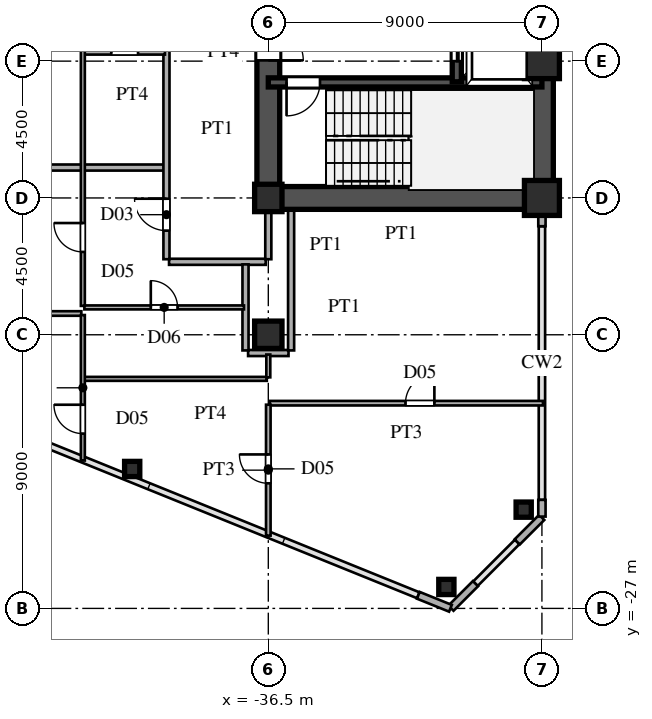
"""IFC4 building model, lengths in metres.
Left out: names, types, materials, properties, quantities, classifications, styles, units other than length and angle.
Written with IfcOpenShell. Run it as: python <this file> out.ifc"""

import sys

from ifc_helpers import new_model, si_unit, direction, frame, frame_2d, origin, origin_2d, place, context, subcontext, project, spatial, rectangle, hollow_rectangle, i_section, extrude, source, transform, mapped, element, fill, save


model = new_model("IFC4")
c1 = context("Model", 3, precision=1e-05, world=origin(), true_north=direction((0.0, 1.0)))
c2 = subcontext(c1, "Body", "Model", "MODEL_VIEW")
j1 = project(units=[si_unit("LENGTHUNIT", "METRE"), si_unit("PLANEANGLEUNIT", "RADIAN")], contexts=[c1])
p1 = place(None, origin())
s1 = spatial("IfcSite", under=j1, at=p1, CompositionType="ELEMENT")
p2 = place(p1, origin())
s2 = spatial("IfcBuilding", under=s1, at=p2, CompositionType="ELEMENT")
p3 = place(p2, frame((0.0, 0.0, 58.5)))
s3 = spatial("IfcBuildingStorey", under=s2, at=p3, CompositionType="ELEMENT", Elevation=58.5)
m1 = source(origin(), c2, "Body", "SweptSolid", [
    extrude(hollow_rectangle(XDim=1.15, YDim=1.15, WallThickness=0.048, at=origin_2d()), origin(), (0.0, 0.0, 1.0), 3.6),
])
for number, where, z_axis, x_axis in (
    (1, (-27.5, -13.5, 0.0), (0.0, 0.0, 1.0), (1.0, 0.0, 0.0)),
    (2, (-27.5, -9.0, 0.0), (0.0, 0.0, 1.0), (1.0, 0.0, 0.0)),
):
    element("IfcColumn", number, at=place(p3, frame(where, z_axis=z_axis, x_axis=x_axis)), inside=s3, PredefinedType="COLUMN", context=c2, shape_type="MappedRepresentation", body=[
        mapped(m1, transform((0.0, 0.0, 0.0), scale=1.0)),
    ])
m2 = source(origin(), c2, "Body", "SweptSolid", [
    extrude(i_section(OverallWidth=0.9, OverallDepth=0.9, WebThickness=0.036, FlangeThickness=0.055, at=origin_2d()), origin(), (0.0, 0.0, 1.0), 3.6),
])
for number, where, z_axis, x_axis in (
    (3, (-36.5, -18.0, 0.0), (0.0, 0.0, 1.0), (1.0, 0.0, 0.0)),
    (4, (-36.5, -13.5, 0.0), (0.0, 0.0, 1.0), (1.0, 0.0, 0.0)),
):
    element("IfcColumn", number, at=place(p3, frame(where, z_axis=z_axis, x_axis=x_axis)), inside=s3, PredefinedType="COLUMN", context=c2, shape_type="MappedRepresentation", body=[
        mapped(m2, transform((0.0, 0.0, 0.0), scale=1.0)),
    ])
m3 = source(origin(), c2, "Body", "SweptSolid", [
    extrude(hollow_rectangle(XDim=0.5, YDim=0.5, WallThickness=0.02, at=origin_2d()), origin(), (0.0, 0.0, 1.0), 3.6),
])
for number, where, z_axis, x_axis in (
    (5, (-28.1, -23.751, 0.0), (0.0, 0.0, 1.0), (1.0, 0.0, 0.0)),
    (6, (-30.643, -26.295, 0.0), (0.0, 0.0, 1.0), (1.0, 0.0, 0.0)),
    (7, (-40.977, -22.414, 0.0), (0.0, 0.0, 1.0), (1.0, 0.0, 0.0)),
):
    element("IfcColumn", number, at=place(p3, frame(where, z_axis=z_axis, x_axis=x_axis)), inside=s3, PredefinedType="COLUMN", context=c2, shape_type="MappedRepresentation", body=[
        mapped(m3, transform((0.0, 0.0, 0.0), scale=1.0)),
    ])
p4 = place(p3, frame((-27.5, -23.98, 0.0), z_axis=(0.0, 0.0, 1.0), x_axis=(0.0, 1.0, 0.0)))
e8 = element("IfcWall", 8, at=p4, inside=s3, PredefinedType="SOLIDWALL", context=c2, shape_type="SweptSolid", body=[
    extrude(rectangle(XDim=0.55, YDim=0.24, at=frame_2d((0.275, 0.0))), origin(), (0.0, 0.0, 1.0), 3.38),
])
p5 = place(p3, frame((-27.5, -14.43, 0.0), z_axis=(0.0, 0.0, 1.0), x_axis=(0.0, 1.0, 0.0)))
e9 = element("IfcWall", 9, at=p5, inside=s3, PredefinedType="SOLIDWALL", context=c2, shape_type="SweptSolid", body=[
    extrude(rectangle(XDim=0.55, YDim=0.24, at=frame_2d((0.275, 0.0))), origin(), (0.0, 0.0, 1.0), 1.88),
])
p6 = place(p3, frame((-31.566, -26.569, 0.0), z_axis=(0.0, 0.0, 1.0), x_axis=(0.927007103665, -0.375043770452, 0.0)))
e10 = element("IfcWall", 10, at=p6, inside=s3, PredefinedType="SOLIDWALL", context=c2, shape_type="SweptSolid", body=[
    extrude(rectangle(XDim=1.14, YDim=0.24, at=frame_2d((0.57, 0.0))), origin(), (0.0, 0.0, 1.0), 3.38),
])
for number, where, z_axis, x_axis in (
    (11, (-30.493, -26.993, 0.0), (0.0, 0.0, 1.0), (0.707, 0.707, 0.0)),
    (12, (-28.313, -24.813, 0.0), (0.0, 0.0, 1.0), (0.707, 0.707, 0.0)),
):
    element("IfcWall", number, at=place(p3, frame(where, z_axis=z_axis, x_axis=x_axis)), inside=s3, PredefinedType="SOLIDWALL", context=c2, shape_type="SweptSolid", body=[
        extrude(rectangle(XDim=1.14, YDim=0.24, at=frame_2d((0.57, 0.0))), origin(), (0.0, 0.0, 1.0), 3.38),
    ])
p7 = place(p3, frame((-27.5, -13.5, 0.0), z_axis=(0.0, 0.0, 1.0), x_axis=(0.0, 1.0, 0.0)))
e13 = element("IfcWall", 13, at=p7, inside=s3, PredefinedType="SHEAR", context=c2, shape_type="SweptSolid", body=[
    extrude(rectangle(XDim=12.2, YDim=0.75, at=frame_2d((6.1, 0.0))), origin(), (0.0, 0.0, 1.0), 3.38),
])
p8 = place(p3, frame((-36.5, -13.5, 0.0), z_axis=(0.0, 0.0, 1.0), x_axis=(1.0, 0.0, 0.0)))
e14 = element("IfcWall", 14, at=p8, inside=s3, PredefinedType="SHEAR", context=c2, shape_type="SweptSolid", body=[
    extrude(rectangle(XDim=9.0, YDim=0.75, at=frame_2d((4.5, 0.0))), origin(), (0.0, 0.0, 1.0), 3.38),
])
p9 = place(p3, frame((-36.5, -13.65, 0.0), z_axis=(0.0, 0.0, 1.0), x_axis=(0.0, 1.0, 0.0)))
e15 = element("IfcWall", 15, at=p9, inside=s3, PredefinedType="SHEAR", context=c2, shape_type="SweptSolid", body=[
    extrude(rectangle(XDim=7.15, YDim=0.75, at=frame_2d((3.575, 0.0))), origin(), (0.0, 0.0, 1.0), 3.38),
])
p10 = place(p9, frame((4.675, 0.0, 0.0)))
e16 = element("IfcOpeningElement", 16, at=p10, cuts=e15, PredefinedType="OPENING", context=c2, shape_type="SweptSolid", body=[
    extrude(rectangle(XDim=1.15, YDim=2.2, at=frame_2d((0.575, 1.1))), frame((0.0, 0.385, 0.0), z_axis=(0.0, -1.0, 0.0), x_axis=(1.0, 0.0, 0.0)), (0.0, 0.0, 1.0), 0.77),
])
p11 = place(p3, frame((-36.5, -9.7, 0.0), z_axis=(0.0, 0.0, 1.0), x_axis=(1.0, 0.0, 0.0)))
e17 = element("IfcWall", 17, at=p11, inside=s3, PredefinedType="SHEAR", context=c2, shape_type="SweptSolid", body=[
    extrude(rectangle(XDim=9.0, YDim=0.3, at=frame_2d((4.5, 0.0))), origin(), (0.0, 0.0, 1.0), 3.38),
])
p12 = place(p11, frame((0.6, 0.0, 0.0)))
e18 = element("IfcOpeningElement", 18, at=p12, cuts=e17, PredefinedType="OPENING", context=c2, shape_type="SweptSolid", body=[
    extrude(rectangle(XDim=1.1, YDim=2.2, at=frame_2d((0.55, 1.1))), frame((0.0, 0.16, 0.0), z_axis=(0.0, -1.0, 0.0), x_axis=(1.0, 0.0, 0.0)), (0.0, 0.0, 1.0), 0.32),
])
p13 = place(p3, frame((-30.3, -9.68, 0.0), z_axis=(0.0, 0.0, 1.0), x_axis=(0.0, 1.0, 0.0)))
e19 = element("IfcWall", 19, at=p13, inside=s3, PredefinedType="SHEAR", context=c2, shape_type="SweptSolid", body=[
    extrude(rectangle(XDim=2.56, YDim=0.3, at=frame_2d((1.28, 0.0))), origin(), (0.0, 0.0, 1.0), 3.38),
])
p14 = place(p13, frame((0.68, 0.0, 0.0)))
e20 = element("IfcOpeningElement", 20, at=p14, cuts=e19, PredefinedType="OPENING", context=c2, shape_type="SweptSolid", body=[
    extrude(rectangle(XDim=1.2, YDim=2.25, at=frame_2d((0.6, 1.125))), frame((0.0, 0.16, 0.0), z_axis=(0.0, -1.0, 0.0), x_axis=(1.0, 0.0, 0.0)), (0.0, 0.0, 1.0), 0.32),
])
p15 = place(p3, frame((-36.45, -20.25, 0.0), z_axis=(0.0, 0.0, 1.0), x_axis=(1.0, 0.0, 0.0)))
e21 = element("IfcWall", 21, at=p15, inside=s3, PredefinedType="PARTITIONING", context=c2, shape_type="SweptSolid", body=[
    extrude(rectangle(XDim=8.985, YDim=0.15, at=frame_2d((4.492, 0.0))), origin(), (0.0, 0.0, 1.0), 3.38),
])
p16 = place(p15, frame((4.463, 0.0, 0.0)))
e22 = element("IfcOpeningElement", 22, at=p16, cuts=e21, PredefinedType="OPENING", context=c2, shape_type="SweptSolid", body=[
    extrude(rectangle(XDim=0.95, YDim=2.15, at=frame_2d((0.475, 1.075))), frame((0.0, 0.085, 0.0), z_axis=(0.0, -1.0, 0.0), x_axis=(1.0, 0.0, 0.0)), (0.0, 0.0, 1.0), 0.17),
])
p17 = place(p3, frame((-42.55, -19.45, 0.0), z_axis=(0.0, 0.0, 1.0), x_axis=(1.0, 0.0, 0.0)))
e23 = element("IfcWall", 23, at=p17, inside=s3, PredefinedType="PARTITIONING", context=c2, shape_type="SweptSolid", body=[
    extrude(rectangle(XDim=6.0, YDim=0.13, at=frame_2d((3.0, 0.0))), origin(), (0.0, 0.0, 1.0), 3.38),
])
p18 = place(p3, frame((-37.165, -18.6, 0.0), z_axis=(0.0, 0.0, 1.0), x_axis=(1.0, 0.0, 0.0)))
e24 = element("IfcWall", 24, at=p18, inside=s3, PredefinedType="PARTITIONING", context=c2, shape_type="SweptSolid", body=[
    extrude(rectangle(XDim=1.33, YDim=0.2, at=frame_2d((0.665, 0.0))), origin(), (0.0, 0.0, 1.0), 3.38),
])
p19 = place(p3, frame((-54.412, -17.3, 0.0), z_axis=(0.0, 0.0, 1.0), x_axis=(1.0, 0.0, 0.0)))
e25 = element("IfcWall", 25, at=p19, inside=s3, PredefinedType="PARTITIONING", context=c2, shape_type="SweptSolid", body=[
    extrude(rectangle(XDim=11.762, YDim=0.15, at=frame_2d((5.881, 0.0))), origin(), (0.0, 0.0, 1.0), 3.38),
])
p20 = place(p19, frame((8.362, 0.0, 0.0)))
e26 = element("IfcOpeningElement", 26, at=p20, cuts=e25, PredefinedType="OPENING", context=c2, shape_type="SweptSolid", body=[
    extrude(rectangle(XDim=0.95, YDim=2.15, at=frame_2d((0.475, 1.075))), frame((0.0, 0.085, 0.0), z_axis=(0.0, -1.0, 0.0), x_axis=(1.0, 0.0, 0.0)), (0.0, 0.0, 1.0), 0.17),
])
p21 = place(p3, frame((-42.55, -17.1, 0.0), z_axis=(0.0, 0.0, 1.0), x_axis=(1.0, 0.0, 0.0)))
e27 = element("IfcWall", 27, at=p21, inside=s3, PredefinedType="PARTITIONING", context=c2, shape_type="SweptSolid", body=[
    extrude(rectangle(XDim=5.25, YDim=0.13, at=frame_2d((2.625, 0.0))), origin(), (0.0, 0.0, 1.0), 3.38),
])
p22 = place(p21, frame((2.185, 0.0, 0.0)))
e28 = element("IfcOpeningElement", 28, at=p22, cuts=e27, PredefinedType="OPENING", context=c2, shape_type="SweptSolid", body=[
    extrude(rectangle(XDim=0.88, YDim=2.1, at=frame_2d((0.44, 1.05))), frame((0.0, 0.075, 0.0), z_axis=(0.0, -1.0, 0.0), x_axis=(1.0, 0.0, 0.0)), (0.0, 0.0, 1.0), 0.15),
])
p23 = place(p3, frame((-39.765, -15.6, 0.0), z_axis=(0.0, 0.0, 1.0), x_axis=(1.0, 0.0, 0.0)))
e29 = element("IfcWall", 29, at=p23, inside=s3, PredefinedType="PARTITIONING", context=c2, shape_type="SweptSolid", body=[
    extrude(rectangle(XDim=3.18, YDim=0.2, at=frame_2d((1.59, 0.0))), origin(), (0.0, 0.0, 1.0), 3.38),
])
p24 = place(p3, frame((-66.337, -12.5, 0.0), z_axis=(0.0, 0.0, 1.0), x_axis=(1.0, 0.0, 0.0)))
e30 = element("IfcWall", 30, at=p24, inside=s3, PredefinedType="PARTITIONING", context=c2, shape_type="SweptSolid", body=[
    extrude(rectangle(XDim=26.407, YDim=0.2, at=frame_2d((13.204, 0.0))), origin(), (0.0, 0.0, 1.0), 3.38),
])
p25 = place(p3, frame((-42.55, -8.72, 0.0), z_axis=(0.0, 0.0, 1.0), x_axis=(1.0, 0.0, 0.0)))
e31 = element("IfcWall", 31, at=p25, inside=s3, PredefinedType="PARTITIONING", context=c2, shape_type="SweptSolid", body=[
    extrude(rectangle(XDim=2.65, YDim=0.13, at=frame_2d((1.325, 0.0))), origin(), (0.0, 0.0, 1.0), 3.38),
])
p26 = place(p25, frame((0.885, 0.0, 0.0)))
e32 = element("IfcOpeningElement", 32, at=p26, cuts=e31, PredefinedType="OPENING", context=c2, shape_type="SweptSolid", body=[
    extrude(rectangle(XDim=0.88, YDim=2.1, at=frame_2d((0.44, 1.05))), frame((0.0, 0.075, 0.0), z_axis=(0.0, -1.0, 0.0), x_axis=(1.0, 0.0, 0.0)), (0.0, 0.0, 1.0), 0.15),
])
p27 = place(p3, frame((-42.6, -22.137, 0.0), z_axis=(0.0, 0.0, 1.0), x_axis=(0.0, 1.0, 0.0)))
e33 = element("IfcWall", 33, at=p27, inside=s3, PredefinedType="PARTITIONING", context=c2, shape_type="SweptSolid", body=[
    extrude(rectangle(XDim=4.786, YDim=0.13, at=frame_2d((2.393, 0.0))), origin(), (0.0, 0.0, 1.0), 3.38),
])
p28 = place(p27, frame((0.886, 0.0, 0.0)))
e34 = element("IfcOpeningElement", 34, at=p28, cuts=e33, PredefinedType="OPENING", context=c2, shape_type="SweptSolid", body=[
    extrude(rectangle(XDim=0.95, YDim=2.15, at=frame_2d((0.475, 1.075))), frame((0.0, 0.075, 0.0), z_axis=(0.0, -1.0, 0.0), x_axis=(1.0, 0.0, 0.0)), (0.0, 0.0, 1.0), 0.15),
])
p29 = place(p3, frame((-42.6, -17.05, 0.0), z_axis=(0.0, 0.0, 1.0), x_axis=(0.0, 1.0, 0.0)))
e35 = element("IfcWall", 35, at=p29, inside=s3, PredefinedType="PARTITIONING", context=c2, shape_type="SweptSolid", body=[
    extrude(rectangle(XDim=13.833, YDim=0.13, at=frame_2d((6.917, 0.0))), origin(), (0.0, 0.0, 1.0), 3.38),
])
p30 = place(p29, frame((1.775, 0.0, 0.0)))
e36 = element("IfcOpeningElement", 36, at=p30, cuts=e35, PredefinedType="OPENING", context=c2, shape_type="SweptSolid", body=[
    extrude(rectangle(XDim=0.95, YDim=2.15, at=frame_2d((0.475, 1.075))), frame((0.0, 0.075, 0.0), z_axis=(0.0, -1.0, 0.0), x_axis=(1.0, 0.0, 0.0)), (0.0, 0.0, 1.0), 0.15),
])
p31 = place(p29, frame((11.075, 0.0, 0.0)))
e37 = element("IfcOpeningElement", 37, at=p31, cuts=e35, PredefinedType="OPENING", context=c2, shape_type="SweptSolid", body=[
    extrude(rectangle(XDim=0.95, YDim=2.15, at=frame_2d((0.475, 1.075))), frame((0.0, 0.075, 0.0), z_axis=(0.0, -1.0, 0.0), x_axis=(1.0, 0.0, 0.0)), (0.0, 0.0, 1.0), 0.15),
])
p32 = place(p3, frame((-39.85, -15.515, 0.0), z_axis=(0.0, 0.0, 1.0), x_axis=(0.0, 1.0, 0.0)))
e38 = element("IfcWall", 38, at=p32, inside=s3, PredefinedType="PARTITIONING", context=c2, shape_type="SweptSolid", body=[
    extrude(rectangle(XDim=31.03, YDim=0.2, at=frame_2d((15.515, 0.0))), origin(), (0.0, 0.0, 1.0), 3.38),
])
p33 = place(p32, frame((0.94, 0.0, 0.0)))
e39 = element("IfcOpeningElement", 39, at=p33, cuts=e38, PredefinedType="OPENING", context=c2, shape_type="SweptSolid", body=[
    extrude(rectangle(XDim=1.05, YDim=2.25, at=frame_2d((0.525, 1.125))), frame((0.0, 0.11, 0.0), z_axis=(0.0, -1.0, 0.0), x_axis=(1.0, 0.0, 0.0)), (0.0, 0.0, 1.0), 0.22),
])
p34 = place(p32, frame((9.28, 0.0, 0.0)))
e40 = element("IfcOpeningElement", 40, at=p34, cuts=e38, PredefinedType="OPENING", context=c2, shape_type="SweptSolid", body=[
    extrude(rectangle(XDim=1.05, YDim=2.25, at=frame_2d((0.525, 1.125))), frame((0.0, 0.11, 0.0), z_axis=(0.0, -1.0, 0.0), x_axis=(1.0, 0.0, 0.0)), (0.0, 0.0, 1.0), 0.22),
])
p35 = place(p32, frame((21.825, 0.0, 0.0)))
e41 = element("IfcOpeningElement", 41, at=p35, cuts=e38, PredefinedType="OPENING", context=c2, shape_type="SweptSolid", body=[
    extrude(rectangle(XDim=1.05, YDim=2.25, at=frame_2d((0.525, 1.125))), frame((0.0, 0.11, 0.0), z_axis=(0.0, -1.0, 0.0), x_axis=(1.0, 0.0, 0.0)), (0.0, 0.0, 1.0), 0.22),
])
p36 = place(p32, frame((29.04, 0.0, 0.0)))
e42 = element("IfcOpeningElement", 42, at=p36, cuts=e38, PredefinedType="OPENING", context=c2, shape_type="SweptSolid", body=[
    extrude(rectangle(XDim=1.05, YDim=2.25, at=frame_2d((0.525, 1.125))), frame((0.0, 0.11, 0.0), z_axis=(0.0, -1.0, 0.0), x_axis=(1.0, 0.0, 0.0)), (0.0, 0.0, 1.0), 0.22),
])
p37 = place(p3, frame((-37.25, -18.515, 0.0), z_axis=(0.0, 0.0, 1.0), x_axis=(0.0, 1.0, 0.0)))
e43 = element("IfcWall", 43, at=p37, inside=s3, PredefinedType="PARTITIONING", context=c2, shape_type="SweptSolid", body=[
    extrude(rectangle(XDim=2.83, YDim=0.2, at=frame_2d((1.415, 0.0))), origin(), (0.0, 0.0, 1.0), 3.38),
])
p38 = place(p3, frame((-36.5, -24.606, 0.0), z_axis=(0.0, 0.0, 1.0), x_axis=(0.0, 1.0, 0.0)))
e44 = element("IfcWall", 44, at=p38, inside=s3, PredefinedType="PARTITIONING", context=c2, shape_type="SweptSolid", body=[
    extrude(rectangle(XDim=4.306, YDim=0.15, at=frame_2d((2.153, 0.0))), origin(), (0.0, 0.0, 1.0), 3.38),
])
p39 = place(p38, frame((1.72, 0.0, 0.0)))
e45 = element("IfcOpeningElement", 45, at=p39, cuts=e44, PredefinedType="OPENING", context=c2, shape_type="SweptSolid", body=[
    extrude(rectangle(XDim=0.95, YDim=2.15, at=frame_2d((0.475, 1.075))), frame((0.0, 0.085, 0.0), z_axis=(0.0, -1.0, 0.0), x_axis=(1.0, 0.0, 0.0)), (0.0, 0.0, 1.0), 0.17),
])
p40 = place(p3, frame((-36.5, -19.4, 0.0), z_axis=(0.0, 0.0, 1.0), x_axis=(0.0, 1.0, 0.0)))
e46 = element("IfcWall", 46, at=p40, inside=s3, PredefinedType="PARTITIONING", context=c2, shape_type="SweptSolid", body=[
    extrude(rectangle(XDim=0.75, YDim=0.13, at=frame_2d((0.375, 0.0))), origin(), (0.0, 0.0, 1.0), 3.38),
])
p41 = place(p3, frame((-36.5, -15.515, 0.0), z_axis=(0.0, 0.0, 1.0), x_axis=(0.0, 1.0, 0.0)))
e47 = element("IfcWall", 47, at=p41, inside=s3, PredefinedType="PARTITIONING", context=c2, shape_type="SweptSolid", body=[
    extrude(rectangle(XDim=1.635, YDim=0.2, at=frame_2d((0.817, 0.0))), origin(), (0.0, 0.0, 1.0), 1.38),
])
p42 = place(p3, frame((-35.75, -18.515, 0.0), z_axis=(0.0, 0.0, 1.0), x_axis=(0.0, 1.0, 0.0)))
e48 = element("IfcWall", 48, at=p42, inside=s3, PredefinedType="PARTITIONING", context=c2, shape_type="SweptSolid", body=[
    extrude(rectangle(XDim=4.635, YDim=0.2, at=frame_2d((2.317, 0.0))), origin(), (0.0, 0.0, 1.0), 3.38),
])
m4 = source(origin(), c2, "Body", "SweptSolid", [
    extrude(rectangle(XDim=1.15, YDim=2.2, at=frame_2d((0.575, 1.1))), frame((0.0, 0.025, 0.0), z_axis=(0.0, -1.0, 0.0), x_axis=(1.0, 0.0, 0.0)), (0.0, 0.0, 1.0), 0.05),
])
p43 = place(p10, frame((1.15, 0.0, 0.0), z_axis=(0.0, 0.0, 1.0), x_axis=(-1.0, 0.0, 0.0)))
e49 = element("IfcDoor", 49, at=p43, inside=s3, OperationType="SINGLE_SWING_LEFT", PredefinedType="DOOR", context=c2, shape_type="MappedRepresentation", body=[
    mapped(m4, transform((0.0, 0.0, 0.0), scale=1.0)),
])
fill(e16, e49)
m5 = source(origin(), c2, "Body", "SweptSolid", [
    extrude(rectangle(XDim=1.1, YDim=2.2, at=frame_2d((0.55, 1.1))), frame((0.0, 0.025, 0.0), z_axis=(0.0, -1.0, 0.0), x_axis=(1.0, 0.0, 0.0)), (0.0, 0.0, 1.0), 0.05),
])
p44 = place(p12, frame((1.1, 0.0, 0.0), z_axis=(0.0, 0.0, 1.0), x_axis=(-1.0, 0.0, 0.0)))
e50 = element("IfcDoor", 50, at=p44, inside=s3, OperationType="SINGLE_SWING_LEFT", PredefinedType="DOOR", context=c2, shape_type="MappedRepresentation", body=[
    mapped(m5, transform((0.0, 0.0, 0.0), scale=1.0)),
])
fill(e18, e50)
m6 = source(origin(), c2, "Body", "SweptSolid", [
    extrude(rectangle(XDim=1.2, YDim=2.25, at=frame_2d((0.6, 1.125))), frame((0.0, 0.025, 0.0), z_axis=(0.0, -1.0, 0.0), x_axis=(1.0, 0.0, 0.0)), (0.0, 0.0, 1.0), 0.05),
])
p45 = place(p14, origin())
e51 = element("IfcDoor", 51, at=p45, inside=s3, OperationType="DOUBLE_DOOR_SLIDING", PredefinedType="DOOR", context=c2, shape_type="MappedRepresentation", body=[
    mapped(m6, transform((0.0, 0.0, 0.0), scale=1.0)),
])
fill(e20, e51)
m7 = source(origin(), c2, "Body", "SweptSolid", [
    extrude(rectangle(XDim=0.95, YDim=2.15, at=frame_2d((0.475, 1.075))), frame((0.0, 0.025, 0.0), z_axis=(0.0, -1.0, 0.0), x_axis=(1.0, 0.0, 0.0)), (0.0, 0.0, 1.0), 0.05),
])
p46 = place(p16, origin())
e52 = element("IfcDoor", 52, at=p46, inside=s3, OperationType="SINGLE_SWING_RIGHT", PredefinedType="DOOR", context=c2, shape_type="MappedRepresentation", body=[
    mapped(m7, transform((0.0, 0.0, 0.0), scale=1.0)),
])
fill(e22, e52)
m8 = source(origin(), c2, "Body", "SweptSolid", [
    extrude(rectangle(XDim=0.88, YDim=2.1, at=frame_2d((0.44, 1.05))), frame((0.0, 0.025, 0.0), z_axis=(0.0, -1.0, 0.0), x_axis=(1.0, 0.0, 0.0)), (0.0, 0.0, 1.0), 0.05),
])
p47 = place(p22, origin())
e53 = element("IfcDoor", 53, at=p47, inside=s3, OperationType="SINGLE_SWING_LEFT", PredefinedType="DOOR", context=c2, shape_type="MappedRepresentation", body=[
    mapped(m8, transform((0.0, 0.0, 0.0), scale=1.0)),
])
fill(e28, e53)
p48 = place(p26, origin())
e54 = element("IfcDoor", 54, at=p48, inside=s3, OperationType="SINGLE_SWING_LEFT", PredefinedType="DOOR", context=c2, shape_type="MappedRepresentation", body=[
    mapped(m8, transform((0.0, 0.0, 0.0), scale=1.0)),
])
fill(e32, e54)
p49 = place(p28, origin())
e55 = element("IfcDoor", 55, at=p49, inside=s3, OperationType="SINGLE_SWING_RIGHT", PredefinedType="DOOR", context=c2, shape_type="MappedRepresentation", body=[
    mapped(m7, transform((0.0, 0.0, 0.0), scale=1.0)),
])
fill(e34, e55)
p50 = place(p30, origin())
e56 = element("IfcDoor", 56, at=p50, inside=s3, OperationType="SINGLE_SWING_RIGHT", PredefinedType="DOOR", context=c2, shape_type="MappedRepresentation", body=[
    mapped(m7, transform((0.0, 0.0, 0.0), scale=1.0)),
])
fill(e36, e56)
m9 = source(origin(), c2, "Body", "SweptSolid", [
    extrude(rectangle(XDim=1.05, YDim=2.25, at=frame_2d((0.525, 1.125))), frame((0.0, 0.025, 0.0), z_axis=(0.0, -1.0, 0.0), x_axis=(1.0, 0.0, 0.0)), (0.0, 0.0, 1.0), 0.05),
])
p51 = place(p33, origin())
e57 = element("IfcDoor", 57, at=p51, inside=s3, OperationType="SINGLE_SWING_RIGHT", PredefinedType="DOOR", context=c2, shape_type="MappedRepresentation", body=[
    mapped(m9, transform((0.0, 0.0, 0.0), scale=1.0)),
])
fill(e39, e57)
p52 = place(p39, origin())
e58 = element("IfcDoor", 58, at=p52, inside=s3, OperationType="SINGLE_SWING_RIGHT", PredefinedType="DOOR", context=c2, shape_type="MappedRepresentation", body=[
    mapped(m7, transform((0.0, 0.0, 0.0), scale=1.0)),
])
fill(e45, e58)
save(model, sys.argv[1])
